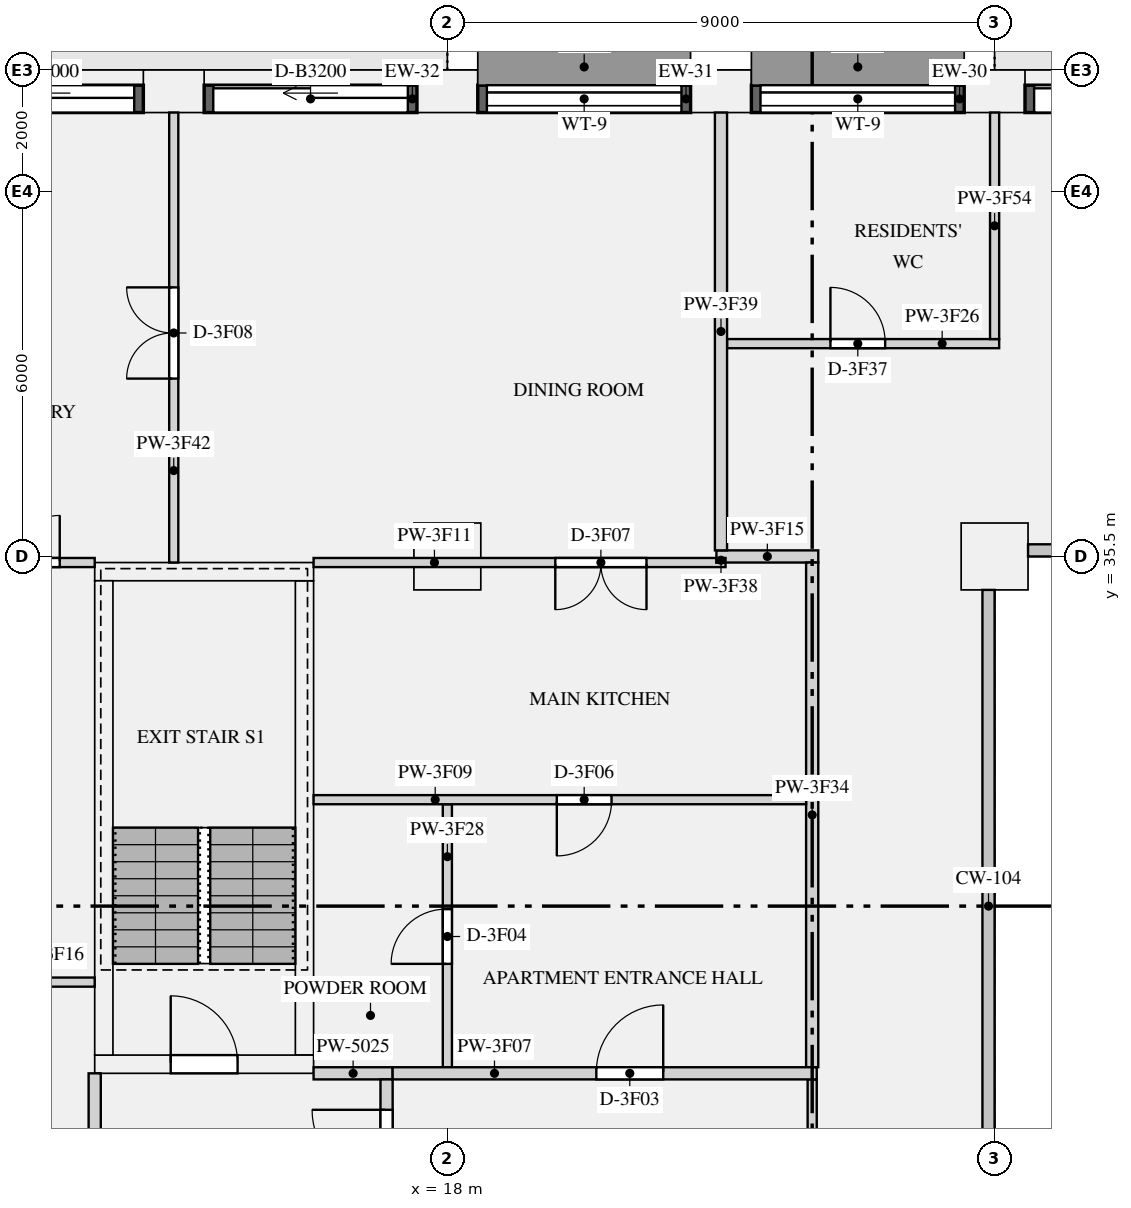
"""IFC4 building model, lengths in metres.
Left out: names, types, materials, properties, quantities, classifications, styles, units other than length and angle.
Written with IfcOpenShell. Run it as: python <this file> out.ifc"""

import sys

from ifc_helpers import new_model, si_unit, direction, frame, frame_2d, origin, origin_2d, place, context, subcontext, project, spatial, rectangle, extrude, element, fill, save


model = new_model("IFC4")
c1 = context("Model", 3, precision=1e-05, world=origin(), true_north=direction((0.0, 1.0)))
c2 = subcontext(c1, "Body", "Model", "MODEL_VIEW")
j1 = project(units=[si_unit("LENGTHUNIT", "METRE"), si_unit("PLANEANGLEUNIT", "RADIAN")], contexts=[c1])
p1 = place(None, origin())
s1 = spatial("IfcSite", under=j1, at=p1, CompositionType="ELEMENT")
p2 = place(p1, origin())
s2 = spatial("IfcBuilding", under=s1, at=p2, CompositionType="ELEMENT")
p3 = place(p2, frame((0.0, 0.0, 182.25)))
s3 = spatial("IfcBuildingStorey", under=s2, at=p3, CompositionType="ELEMENT", Elevation=182.25)
for number, where, z_axis, x_axis in (
    (1, (27.0, 43.15, 0.0), (0.0, 0.0, 1.0), (-1.0, 0.0, 0.0)),
    (2, (22.5, 43.15, 0.0), (0.0, 0.0, 1.0), (-1.0, 0.0, 0.0)),
    (3, (18.0, 43.15, 0.0), (0.0, 0.0, 1.0), (-1.0, 0.0, 0.0)),
    (4, (13.5, 43.15, 0.0), (0.0, 0.0, 1.0), (-1.0, 0.0, 0.0)),
):
    element("IfcColumn", number, at=place(p3, frame(where, z_axis=z_axis, x_axis=x_axis)), inside=s3, PredefinedType="USERDEFINED", context=c2, shape_type="SweptSolid", body=[
        extrude(rectangle(XDim=1.0, YDim=0.7, at=origin_2d()), origin(), (0.0, 0.0, 1.0), 2.65),
    ])
for number, where, z_axis, x_axis in (
    (5, (18.0, 35.5, 0.0), (0.0, 0.0, 1.0), (1.0, 0.0, 0.0)),
    (6, (27.0, 35.5, 0.0), (0.0, 0.0, 1.0), (1.0, 0.0, 0.0)),
):
    element("IfcColumn", number, at=place(p3, frame(where, z_axis=z_axis, x_axis=x_axis)), inside=s3, PredefinedType="COLUMN", context=c2, shape_type="SweptSolid", body=[
        extrude(rectangle(XDim=1.1, YDim=1.1, at=origin_2d()), origin(), (0.0, 0.0, 1.0), 3.15),
    ])
p4 = place(p3, frame((12.2, 27.15, 0.0), z_axis=(0.0, 0.0, 1.0), x_axis=(1.0, 0.0, 0.0)))
e7 = element("IfcWall", 7, at=p4, inside=s3, PredefinedType="SHEAR", context=c2, shape_type="SweptSolid", body=[
    extrude(rectangle(XDim=3.6, YDim=0.3, at=frame_2d((1.8, 0.0))), origin(), (0.0, 0.0, 1.0), 3.15),
])
p5 = place(p4, frame((1.25, 0.0, 0.0)))
e8 = element("IfcOpeningElement", 8, at=p5, cuts=e7, PredefinedType="OPENING", context=c2, shape_type="SweptSolid", body=[
    extrude(rectangle(XDim=1.1, YDim=2.1, at=frame_2d((0.55, 1.05))), frame((0.0, 0.16, 0.0), z_axis=(0.0, -1.0, 0.0), x_axis=(1.0, 0.0, 0.0)), (0.0, 0.0, 1.0), 0.32),
])
p6 = place(p3, frame((12.2, 35.25, 0.0), z_axis=(0.0, 0.0, 1.0), x_axis=(1.0, 0.0, 0.0)))
e9 = element("IfcWall", 9, at=p6, inside=s3, PredefinedType="SHEAR", context=c2, shape_type="SweptSolid", body=[
    extrude(rectangle(XDim=3.6, YDim=0.3, at=frame_2d((1.8, 0.0))), origin(), (0.0, 0.0, 1.0), 3.15),
])
for number, where, z_axis, x_axis in (
    (10, (12.35, 27.3, 0.0), (0.0, 0.0, 1.0), (0.0, 1.0, 0.0)),
    (11, (15.65, 27.3, 0.0), (0.0, 0.0, 1.0), (0.0, 1.0, 0.0)),
):
    element("IfcWall", number, at=place(p3, frame(where, z_axis=z_axis, x_axis=x_axis)), inside=s3, PredefinedType="SHEAR", context=c2, shape_type="SweptSolid", body=[
        extrude(rectangle(XDim=7.8, YDim=0.3, at=frame_2d((3.9, 0.0))), origin(), (0.0, 0.0, 1.0), 3.15),
    ])
p7 = place(p3, frame((31.0, 43.025, 0.0), z_axis=(0.0, 0.0, 1.0), x_axis=(-1.0, 0.0, 0.0)))
e12 = element("IfcWall", 12, at=p7, inside=s3, PredefinedType="SOLIDWALL", context=c2, shape_type="SweptSolid", body=[
    extrude(rectangle(XDim=3.5, YDim=0.45, at=frame_2d((1.75, 0.0))), origin(), (0.0, 0.0, 1.0), 2.65),
])
p8 = place(p7, frame((0.15, 0.0, 0.0)))
e13 = element("IfcOpeningElement", 13, at=p8, cuts=e12, PredefinedType="OPENING", context=c2, shape_type="SweptSolid", body=[
    extrude(rectangle(XDim=3.2, YDim=2.3, at=frame_2d((1.6, 1.15))), frame((0.0, 0.235, 0.0), z_axis=(0.0, -1.0, 0.0), x_axis=(1.0, 0.0, 0.0)), (0.0, 0.0, 1.0), 0.47),
])
p9 = place(p3, frame((26.5, 43.025, 0.9), z_axis=(0.0, 0.0, 1.0), x_axis=(-1.0, 0.0, 0.0)))
e14 = element("IfcWall", 14, at=p9, inside=s3, PredefinedType="SOLIDWALL", context=c2, shape_type="SweptSolid", body=[
    extrude(rectangle(XDim=3.5, YDim=0.45, at=frame_2d((1.75, 0.0))), origin(), (0.0, 0.0, 1.0), 1.75),
])
p10 = place(p9, frame((0.15, 0.0, 0.15)))
e15 = element("IfcOpeningElement", 15, at=p10, cuts=e14, PredefinedType="OPENING", context=c2, shape_type="SweptSolid", body=[
    extrude(rectangle(XDim=3.2, YDim=1.5, at=frame_2d((1.6, 0.75))), frame((0.0, 0.235, 0.0), z_axis=(0.0, -1.0, 0.0), x_axis=(1.0, 0.0, 0.0)), (0.0, 0.0, 1.0), 0.47),
])
p11 = place(p3, frame((22.0, 43.025, 0.9), z_axis=(0.0, 0.0, 1.0), x_axis=(-1.0, 0.0, 0.0)))
e16 = element("IfcWall", 16, at=p11, inside=s3, PredefinedType="SOLIDWALL", context=c2, shape_type="SweptSolid", body=[
    extrude(rectangle(XDim=3.5, YDim=0.45, at=frame_2d((1.75, 0.0))), origin(), (0.0, 0.0, 1.0), 1.75),
])
p12 = place(p11, frame((0.15, 0.0, 0.15)))
e17 = element("IfcOpeningElement", 17, at=p12, cuts=e16, PredefinedType="OPENING", context=c2, shape_type="SweptSolid", body=[
    extrude(rectangle(XDim=3.2, YDim=1.5, at=frame_2d((1.6, 0.75))), frame((0.0, 0.235, 0.0), z_axis=(0.0, -1.0, 0.0), x_axis=(1.0, 0.0, 0.0)), (0.0, 0.0, 1.0), 0.47),
])
p13 = place(p3, frame((17.5, 43.025, 0.0), z_axis=(0.0, 0.0, 1.0), x_axis=(-1.0, 0.0, 0.0)))
e18 = element("IfcWall", 18, at=p13, inside=s3, PredefinedType="SOLIDWALL", context=c2, shape_type="SweptSolid", body=[
    extrude(rectangle(XDim=3.5, YDim=0.45, at=frame_2d((1.75, 0.0))), origin(), (0.0, 0.0, 1.0), 2.65),
])
p14 = place(p13, frame((0.15, 0.0, 0.0)))
e19 = element("IfcOpeningElement", 19, at=p14, cuts=e18, PredefinedType="OPENING", context=c2, shape_type="SweptSolid", body=[
    extrude(rectangle(XDim=3.2, YDim=2.3, at=frame_2d((1.6, 1.15))), frame((0.0, 0.235, 0.0), z_axis=(0.0, -1.0, 0.0), x_axis=(1.0, 0.0, 0.0)), (0.0, 0.0, 1.0), 0.47),
])
p15 = place(p3, frame((13.0, 43.025, 0.0), z_axis=(0.0, 0.0, 1.0), x_axis=(-1.0, 0.0, 0.0)))
e20 = element("IfcWall", 20, at=p15, inside=s3, PredefinedType="SOLIDWALL", context=c2, shape_type="SweptSolid", body=[
    extrude(rectangle(XDim=3.3, YDim=0.45, at=frame_2d((1.65, 0.0))), origin(), (0.0, 0.0, 1.0), 2.65),
])
p16 = place(p15, frame((0.15, 0.0, 0.0)))
e21 = element("IfcOpeningElement", 21, at=p16, cuts=e20, PredefinedType="OPENING", context=c2, shape_type="SweptSolid", body=[
    extrude(rectangle(XDim=3.0, YDim=2.3, at=frame_2d((1.5, 1.15))), frame((0.0, 0.235, 0.0), z_axis=(0.0, -1.0, 0.0), x_axis=(1.0, 0.0, 0.0)), (0.0, 0.0, 1.0), 0.47),
])
p17 = place(p3, frame((15.8, 27.0, 0.0), z_axis=(0.0, 0.0, 1.0), x_axis=(1.0, 0.0, 0.0)))
e22 = element("IfcWall", 22, at=p17, inside=s3, PredefinedType="PARTITIONING", context=c2, shape_type="SweptSolid", body=[
    extrude(rectangle(XDim=1.3, YDim=0.2, at=frame_2d((0.65, 0.0))), origin(), (0.0, 0.0, 1.0), 2.65),
])
p18 = place(p3, frame((12.2, 23.1, 0.0), z_axis=(0.0, 0.0, 1.0), x_axis=(0.0, 1.0, 0.0)))
e23 = element("IfcWall", 23, at=p18, inside=s3, PredefinedType="PARTITIONING", context=c2, shape_type="SweptSolid", body=[
    extrude(rectangle(XDim=3.9, YDim=0.2, at=frame_2d((1.95, 0.0))), origin(), (0.0, 0.0, 1.0), 2.65),
])
p19 = place(p3, frame((17.0, 23.1, 0.0), z_axis=(0.0, 0.0, 1.0), x_axis=(0.0, 1.0, 0.0)))
e24 = element("IfcWall", 24, at=p19, inside=s3, PredefinedType="PARTITIONING", context=c2, shape_type="SweptSolid", body=[
    extrude(rectangle(XDim=3.8, YDim=0.2, at=frame_2d((1.9, 0.0))), origin(), (0.0, 0.0, 1.0), 2.65),
])
p20 = place(p19, frame((2.1, 0.0, 0.0)))
e25 = element("IfcOpeningElement", 25, at=p20, cuts=e24, PredefinedType="OPENING", context=c2, shape_type="SweptSolid", body=[
    extrude(rectangle(XDim=1.2, YDim=2.1, at=frame_2d((0.6, 1.05))), frame((0.0, 0.11, 0.0), z_axis=(0.0, -1.0, 0.0), x_axis=(1.0, 0.0, 0.0)), (0.0, 0.0, 1.0), 0.22),
])
p21 = place(p3, frame((17.1, 27.0, 0.0), z_axis=(0.0, 0.0, 1.0), x_axis=(1.0, 0.0, 0.0)))
e26 = element("IfcWall", 26, at=p21, inside=s3, PredefinedType="PARTITIONING", context=c2, shape_type="SweptSolid", body=[
    extrude(rectangle(XDim=6.975, YDim=0.2, at=frame_2d((3.487, 0.0))), origin(), (0.0, 0.0, 1.0), 2.65),
])
p22 = place(p21, frame((3.35, 0.0, 0.0)))
e27 = element("IfcOpeningElement", 27, at=p22, cuts=e26, PredefinedType="OPENING", context=c2, shape_type="SweptSolid", body=[
    extrude(rectangle(XDim=1.1, YDim=2.1, at=frame_2d((0.55, 1.05))), frame((0.0, 0.11, 0.0), z_axis=(0.0, -1.0, 0.0), x_axis=(1.0, 0.0, 0.0)), (0.0, 0.0, 1.0), 0.22),
])
p23 = place(p3, frame((15.8, 31.5, 0.0), z_axis=(0.0, 0.0, 1.0), x_axis=(1.0, 0.0, 0.0)))
e28 = element("IfcWall", 28, at=p23, inside=s3, PredefinedType="PARTITIONING", context=c2, shape_type="SweptSolid", body=[
    extrude(rectangle(XDim=8.1, YDim=0.15, at=frame_2d((4.05, 0.0))), origin(), (0.0, 0.0, 1.0), 2.65),
])
p24 = place(p23, frame((4.0, 0.0, 0.0)))
e29 = element("IfcOpeningElement", 29, at=p24, cuts=e28, PredefinedType="OPENING", context=c2, shape_type="SweptSolid", body=[
    extrude(rectangle(XDim=0.9, YDim=2.1, at=frame_2d((0.45, 1.05))), frame((0.0, 0.085, 0.0), z_axis=(0.0, -1.0, 0.0), x_axis=(1.0, 0.0, 0.0)), (0.0, 0.0, 1.0), 0.17),
])
p25 = place(p3, frame((5.2, 35.4, 0.0), z_axis=(0.0, 0.0, 1.0), x_axis=(1.0, 0.0, 0.0)))
e30 = element("IfcWall", 30, at=p25, inside=s3, PredefinedType="PARTITIONING", context=c2, shape_type="SweptSolid", body=[
    extrude(rectangle(XDim=7.0, YDim=0.15, at=frame_2d((3.5, 0.0))), origin(), (0.0, 0.0, 1.0), 2.65),
])
p26 = place(p25, frame((4.925, 0.0, 0.0)))
e31 = element("IfcOpeningElement", 31, at=p26, cuts=e30, PredefinedType="OPENING", context=c2, shape_type="SweptSolid", body=[
    extrude(rectangle(XDim=1.5, YDim=2.1, at=frame_2d((0.75, 1.05))), frame((0.0, 0.085, 0.0), z_axis=(0.0, -1.0, 0.0), x_axis=(1.0, 0.0, 0.0)), (0.0, 0.0, 1.0), 0.17),
])
p27 = place(p3, frame((15.8, 35.4, 0.0), z_axis=(0.0, 0.0, 1.0), x_axis=(1.0, 0.0, 0.0)))
e32 = element("IfcWall", 32, at=p27, inside=s3, PredefinedType="PARTITIONING", context=c2, shape_type="SweptSolid", body=[
    extrude(rectangle(XDim=6.775, YDim=0.15, at=frame_2d((3.387, 0.0))), origin(), (0.0, 0.0, 1.0), 2.65),
])
p28 = place(p27, frame((3.975, 0.0, 0.0)))
e33 = element("IfcOpeningElement", 33, at=p28, cuts=e32, PredefinedType="OPENING", context=c2, shape_type="SweptSolid", body=[
    extrude(rectangle(XDim=1.5, YDim=2.1, at=frame_2d((0.75, 1.05))), frame((0.0, 0.085, 0.0), z_axis=(0.0, -1.0, 0.0), x_axis=(1.0, 0.0, 0.0)), (0.0, 0.0, 1.0), 0.17),
])
p29 = place(p3, frame((22.425, 35.5, 0.0), z_axis=(0.0, 0.0, 1.0), x_axis=(1.0, 0.0, 0.0)))
e34 = element("IfcWall", 34, at=p29, inside=s3, PredefinedType="PARTITIONING", context=c2, shape_type="SweptSolid", body=[
    extrude(rectangle(XDim=1.675, YDim=0.2, at=frame_2d((0.837, 0.0))), origin(), (0.0, 0.0, 1.0), 2.65),
])
p30 = place(p3, frame((7.7, 28.5, 0.0), z_axis=(0.0, 0.0, 1.0), x_axis=(1.0, 0.0, 0.0)))
e35 = element("IfcWall", 35, at=p30, inside=s3, PredefinedType="PARTITIONING", context=c2, shape_type="SweptSolid", body=[
    extrude(rectangle(XDim=4.5, YDim=0.15, at=frame_2d((2.25, 0.0))), origin(), (0.0, 0.0, 1.0), 2.65),
])
p31 = place(p30, frame((1.425, 0.0, 0.0)))
e36 = element("IfcOpeningElement", 36, at=p31, cuts=e35, PredefinedType="OPENING", context=c2, shape_type="SweptSolid", body=[
    extrude(rectangle(XDim=1.5, YDim=2.1, at=frame_2d((0.75, 1.05))), frame((0.0, 0.085, 0.0), z_axis=(0.0, -1.0, 0.0), x_axis=(1.0, 0.0, 0.0)), (0.0, 0.0, 1.0), 0.17),
])
p32 = place(p3, frame((22.6, 39.0, 0.0), z_axis=(0.0, 0.0, 1.0), x_axis=(1.0, 0.0, 0.0)))
e37 = element("IfcWall", 37, at=p32, inside=s3, PredefinedType="PARTITIONING", context=c2, shape_type="SweptSolid", body=[
    extrude(rectangle(XDim=4.475, YDim=0.15, at=frame_2d((2.237, 0.0))), origin(), (0.0, 0.0, 1.0), 2.65),
])
p33 = place(p32, frame((1.7, 0.0, 0.0)))
e38 = element("IfcOpeningElement", 38, at=p33, cuts=e37, PredefinedType="OPENING", context=c2, shape_type="SweptSolid", body=[
    extrude(rectangle(XDim=0.9, YDim=2.1, at=frame_2d((0.45, 1.05))), frame((0.0, 0.085, 0.0), z_axis=(0.0, -1.0, 0.0), x_axis=(1.0, 0.0, 0.0)), (0.0, 0.0, 1.0), 0.17),
])
p34 = place(p3, frame((18.0, 27.1, 0.0), z_axis=(0.0, 0.0, 1.0), x_axis=(0.0, 1.0, 0.0)))
e39 = element("IfcWall", 39, at=p34, inside=s3, PredefinedType="PARTITIONING", context=c2, shape_type="SweptSolid", body=[
    extrude(rectangle(XDim=4.325, YDim=0.15, at=frame_2d((2.163, 0.0))), origin(), (0.0, 0.0, 1.0), 2.65),
])
p35 = place(p34, frame((1.7, 0.0, 0.0)))
e40 = element("IfcOpeningElement", 40, at=p35, cuts=e39, PredefinedType="OPENING", context=c2, shape_type="SweptSolid", body=[
    extrude(rectangle(XDim=0.9, YDim=2.1, at=frame_2d((0.45, 1.05))), frame((0.0, 0.085, 0.0), z_axis=(0.0, -1.0, 0.0), x_axis=(1.0, 0.0, 0.0)), (0.0, 0.0, 1.0), 0.17),
])
p36 = place(p3, frame((24.0, 24.075, 0.0), z_axis=(0.0, 0.0, 1.0), x_axis=(0.0, 1.0, 0.0)))
e41 = element("IfcWall", 41, at=p36, inside=s3, PredefinedType="PARTITIONING", context=c2, shape_type="SweptSolid", body=[
    extrude(rectangle(XDim=2.825, YDim=0.15, at=frame_2d((1.413, 0.0))), origin(), (0.0, 0.0, 1.0), 2.65),
])
p37 = place(p36, frame((0.975, 0.0, 0.0)))
e42 = element("IfcOpeningElement", 42, at=p37, cuts=e41, PredefinedType="OPENING", context=c2, shape_type="SweptSolid", body=[
    extrude(rectangle(XDim=0.9, YDim=2.1, at=frame_2d((0.45, 1.05))), frame((0.0, 0.085, 0.0), z_axis=(0.0, -1.0, 0.0), x_axis=(1.0, 0.0, 0.0)), (0.0, 0.0, 1.0), 0.17),
])
p38 = place(p3, frame((24.0, 27.1, 0.0), z_axis=(0.0, 0.0, 1.0), x_axis=(0.0, 1.0, 0.0)))
e43 = element("IfcWall", 43, at=p38, inside=s3, PredefinedType="PARTITIONING", context=c2, shape_type="SweptSolid", body=[
    extrude(rectangle(XDim=8.3, YDim=0.2, at=frame_2d((4.15, 0.0))), origin(), (0.0, 0.0, 1.0), 2.65),
])
p39 = place(p3, frame((22.5, 35.4, 0.0), z_axis=(0.0, 0.0, 1.0), x_axis=(0.0, 1.0, 0.0)))
e44 = element("IfcWall", 44, at=p39, inside=s3, PredefinedType="PARTITIONING", context=c2, shape_type="SweptSolid", body=[
    extrude(rectangle(XDim=0.075, YDim=0.15, at=frame_2d((0.038, 0.0))), origin(), (0.0, 0.0, 1.0), 2.65),
])
p40 = place(p3, frame((22.5, 35.6, 0.0), z_axis=(0.0, 0.0, 1.0), x_axis=(0.0, 1.0, 0.0)))
e45 = element("IfcWall", 45, at=p40, inside=s3, PredefinedType="PARTITIONING", context=c2, shape_type="SweptSolid", body=[
    extrude(rectangle(XDim=7.2, YDim=0.2, at=frame_2d((3.6, 0.0))), origin(), (0.0, 0.0, 1.0), 2.65),
])
p41 = place(p3, frame((13.5, 35.4, 0.0), z_axis=(0.0, 0.0, 1.0), x_axis=(0.0, 1.0, 0.0)))
e46 = element("IfcWall", 46, at=p41, inside=s3, PredefinedType="PARTITIONING", context=c2, shape_type="SweptSolid", body=[
    extrude(rectangle(XDim=7.4, YDim=0.15, at=frame_2d((3.7, 0.0))), origin(), (0.0, 0.0, 1.0), 2.65),
])
p42 = place(p41, frame((3.025, 0.0, 0.0)))
e47 = element("IfcOpeningElement", 47, at=p42, cuts=e46, PredefinedType="OPENING", context=c2, shape_type="SweptSolid", body=[
    extrude(rectangle(XDim=1.5, YDim=2.1, at=frame_2d((0.75, 1.05))), frame((0.0, 0.085, 0.0), z_axis=(0.0, -1.0, 0.0), x_axis=(1.0, 0.0, 0.0)), (0.0, 0.0, 1.0), 0.17),
])
p43 = place(p3, frame((27.0, 39.075, 0.0), z_axis=(0.0, 0.0, 1.0), x_axis=(0.0, 1.0, 0.0)))
e48 = element("IfcWall", 48, at=p43, inside=s3, PredefinedType="PARTITIONING", context=c2, shape_type="SweptSolid", body=[
    extrude(rectangle(XDim=3.725, YDim=0.15, at=frame_2d((1.863, 0.0))), origin(), (0.0, 0.0, 1.0), 2.65),
])
p44 = place(p8, origin())
e49 = element("IfcDoor", 49, at=p44, inside=s3, OperationType="SLIDING_TO_LEFT", PredefinedType="DOOR", context=c2, shape_type="SweptSolid", body=[
    extrude(rectangle(XDim=3.2, YDim=2.3, at=frame_2d((1.6, 1.15))), frame((0.0, -0.07, 0.0), z_axis=(0.0, -1.0, 0.0), x_axis=(1.0, 0.0, 0.0)), (0.0, 0.0, 1.0), 0.05),
])
fill(e13, e49)
p45 = place(p10, origin())
e50 = element("IfcWindow", 50, at=p45, inside=s3, PartitioningType="SINGLE_PANEL", PredefinedType="WINDOW", context=c2, shape_type="SweptSolid", body=[
    extrude(rectangle(XDim=3.2, YDim=1.5, at=frame_2d((1.6, 0.75))), frame((0.0, -0.065, 0.0), z_axis=(0.0, -1.0, 0.0), x_axis=(1.0, 0.0, 0.0)), (0.0, 0.0, 1.0), 0.06),
])
fill(e15, e50)
p46 = place(p12, origin())
e51 = element("IfcWindow", 51, at=p46, inside=s3, PartitioningType="SINGLE_PANEL", PredefinedType="WINDOW", context=c2, shape_type="SweptSolid", body=[
    extrude(rectangle(XDim=3.2, YDim=1.5, at=frame_2d((1.6, 0.75))), frame((0.0, -0.065, 0.0), z_axis=(0.0, -1.0, 0.0), x_axis=(1.0, 0.0, 0.0)), (0.0, 0.0, 1.0), 0.06),
])
fill(e17, e51)
p47 = place(p14, origin())
e52 = element("IfcDoor", 52, at=p47, inside=s3, OperationType="SLIDING_TO_LEFT", PredefinedType="DOOR", context=c2, shape_type="SweptSolid", body=[
    extrude(rectangle(XDim=3.2, YDim=2.3, at=frame_2d((1.6, 1.15))), frame((0.0, -0.07, 0.0), z_axis=(0.0, -1.0, 0.0), x_axis=(1.0, 0.0, 0.0)), (0.0, 0.0, 1.0), 0.05),
])
fill(e19, e52)
p48 = place(p16, origin())
e53 = element("IfcDoor", 53, at=p48, inside=s3, OperationType="SLIDING_TO_LEFT", PredefinedType="DOOR", context=c2, shape_type="SweptSolid", body=[
    extrude(rectangle(XDim=3.0, YDim=2.3, at=frame_2d((1.5, 1.15))), frame((0.0, -0.07, 0.0), z_axis=(0.0, -1.0, 0.0), x_axis=(1.0, 0.0, 0.0)), (0.0, 0.0, 1.0), 0.05),
])
fill(e21, e53)
p49 = place(p5, origin())
e54 = element("IfcDoor", 54, at=p49, inside=s3, OperationType="SINGLE_SWING_LEFT", PredefinedType="DOOR", context=c2, shape_type="SweptSolid", body=[
    extrude(rectangle(XDim=1.1, YDim=2.1, at=frame_2d((0.55, 1.05))), frame((0.0, 0.025, 0.0), z_axis=(0.0, -1.0, 0.0), x_axis=(1.0, 0.0, 0.0)), (0.0, 0.0, 1.0), 0.05),
])
fill(e8, e54)
p50 = place(p20, origin())
e55 = element("IfcDoor", 55, at=p50, inside=s3, OperationType="SINGLE_SWING_RIGHT", PredefinedType="DOOR", context=c2, shape_type="SweptSolid", body=[
    extrude(rectangle(XDim=1.2, YDim=2.1, at=frame_2d((0.6, 1.05))), frame((0.0, 0.025, 0.0), z_axis=(0.0, -1.0, 0.0), x_axis=(1.0, 0.0, 0.0)), (0.0, 0.0, 1.0), 0.05),
])
fill(e25, e55)
p51 = place(p22, origin())
e56 = element("IfcDoor", 56, at=p51, inside=s3, OperationType="SINGLE_SWING_RIGHT", PredefinedType="DOOR", context=c2, shape_type="SweptSolid", body=[
    extrude(rectangle(XDim=1.1, YDim=2.1, at=frame_2d((0.55, 1.05))), frame((0.0, 0.025, 0.0), z_axis=(0.0, -1.0, 0.0), x_axis=(1.0, 0.0, 0.0)), (0.0, 0.0, 1.0), 0.05),
])
fill(e27, e56)
p52 = place(p35, origin())
e57 = element("IfcDoor", 57, at=p52, inside=s3, OperationType="SINGLE_SWING_LEFT", PredefinedType="DOOR", context=c2, shape_type="SweptSolid", body=[
    extrude(rectangle(XDim=0.9, YDim=2.1, at=frame_2d((0.45, 1.05))), frame((0.0, 0.025, 0.0), z_axis=(0.0, -1.0, 0.0), x_axis=(1.0, 0.0, 0.0)), (0.0, 0.0, 1.0), 0.05),
])
fill(e40, e57)
p53 = place(p24, frame((0.9, 0.0, 0.0), z_axis=(0.0, 0.0, 1.0), x_axis=(-1.0, 0.0, 0.0)))
e58 = element("IfcDoor", 58, at=p53, inside=s3, OperationType="SINGLE_SWING_RIGHT", PredefinedType="DOOR", context=c2, shape_type="SweptSolid", body=[
    extrude(rectangle(XDim=0.9, YDim=2.1, at=frame_2d((0.45, 1.05))), frame((0.0, 0.025, 0.0), z_axis=(0.0, -1.0, 0.0), x_axis=(1.0, 0.0, 0.0)), (0.0, 0.0, 1.0), 0.05),
])
fill(e29, e58)
p54 = place(p28, frame((1.5, 0.0, 0.0), z_axis=(0.0, 0.0, 1.0), x_axis=(-1.0, 0.0, 0.0)))
e59 = element("IfcDoor", 59, at=p54, inside=s3, OperationType="DOUBLE_DOOR_SINGLE_SWING", PredefinedType="DOOR", context=c2, shape_type="SweptSolid", body=[
    extrude(rectangle(XDim=1.5, YDim=2.1, at=frame_2d((0.75, 1.05))), frame((0.0, 0.025, 0.0), z_axis=(0.0, -1.0, 0.0), x_axis=(1.0, 0.0, 0.0)), (0.0, 0.0, 1.0), 0.05),
])
fill(e33, e59)
p55 = place(p42, origin())
e60 = element("IfcDoor", 60, at=p55, inside=s3, OperationType="DOUBLE_DOOR_SINGLE_SWING", PredefinedType="DOOR", context=c2, shape_type="SweptSolid", body=[
    extrude(rectangle(XDim=1.5, YDim=2.1, at=frame_2d((0.75, 1.05))), frame((0.0, 0.025, 0.0), z_axis=(0.0, -1.0, 0.0), x_axis=(1.0, 0.0, 0.0)), (0.0, 0.0, 1.0), 0.05),
])
fill(e47, e60)
p56 = place(p26, origin())
e61 = element("IfcDoor", 61, at=p56, inside=s3, OperationType="DOUBLE_DOOR_SINGLE_SWING", PredefinedType="DOOR", context=c2, shape_type="SweptSolid", body=[
    extrude(rectangle(XDim=1.5, YDim=2.1, at=frame_2d((0.75, 1.05))), frame((0.0, 0.025, 0.0), z_axis=(0.0, -1.0, 0.0), x_axis=(1.0, 0.0, 0.0)), (0.0, 0.0, 1.0), 0.05),
])
fill(e31, e61)
p57 = place(p33, origin())
e62 = element("IfcDoor", 62, at=p57, inside=s3, OperationType="SINGLE_SWING_LEFT", PredefinedType="DOOR", context=c2, shape_type="SweptSolid", body=[
    extrude(rectangle(XDim=0.9, YDim=2.1, at=frame_2d((0.45, 1.05))), frame((0.0, 0.025, 0.0), z_axis=(0.0, -1.0, 0.0), x_axis=(1.0, 0.0, 0.0)), (0.0, 0.0, 1.0), 0.05),
])
fill(e38, e62)
save(model, sys.argv[1])
